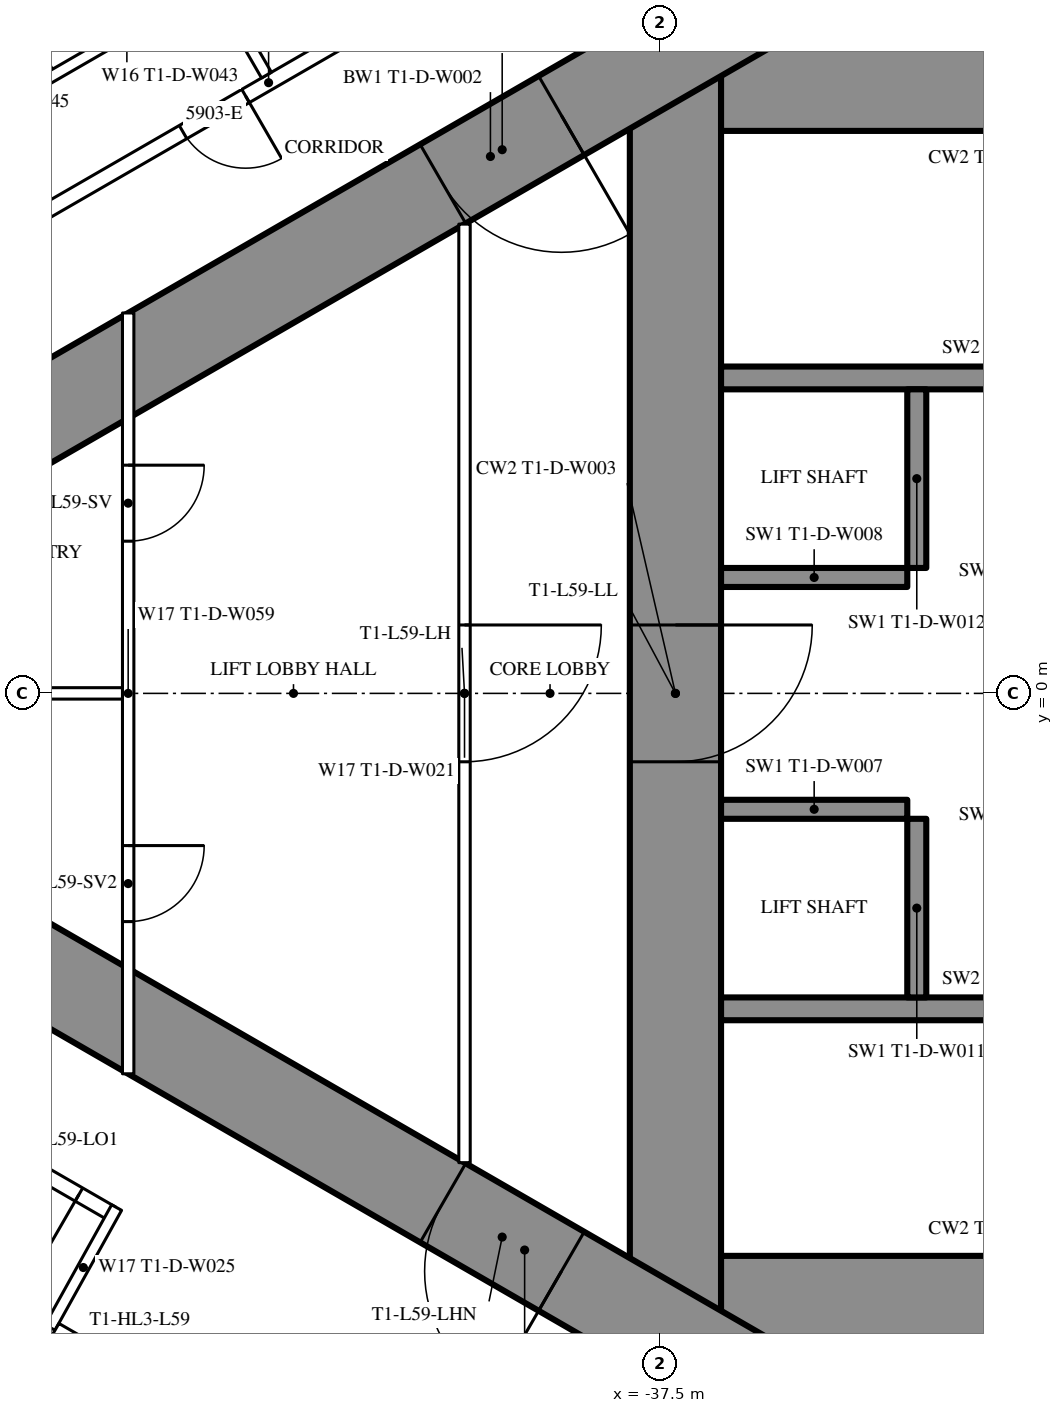
"""IFC4 building model, lengths in metres.
Left out: names, types, materials, properties, quantities, classifications, styles, units other than length and angle.
Written with IfcOpenShell. Run it as: python <this file> out.ifc"""

import sys

from ifc_helpers import new_model, si_unit, direction, frame, frame_2d, origin, place, context, subcontext, project, spatial, rectangle, extrude, element, fill, save


model = new_model("IFC4")
c1 = context("Model", 3, precision=1e-05, world=origin(), true_north=direction((0.0, 1.0)))
c2 = subcontext(c1, "Body", "Model", "MODEL_VIEW")
j1 = project(units=[si_unit("LENGTHUNIT", "METRE"), si_unit("PLANEANGLEUNIT", "RADIAN")], contexts=[c1])
p1 = place(None, origin())
s1 = spatial("IfcSite", under=j1, at=p1, CompositionType="ELEMENT")
p2 = place(p1, origin())
s2 = spatial("IfcBuilding", under=s1, at=p2, CompositionType="ELEMENT")
p3 = place(p2, frame((0.0, 0.0, 222.5)))
s3 = spatial("IfcBuildingStorey", under=s2, at=p3, CompositionType="ELEMENT", Elevation=222.5)
p4 = place(p3, frame((-37.3, 8.6, 0.0), z_axis=(0.0, 0.0, 1.0), x_axis=(0.0, -1.0, 0.0)))
e1 = element("IfcWall", 1, at=p4, inside=s3, PredefinedType="SHEAR", context=c2, shape_type="SweptSolid", body=[
    extrude(rectangle(XDim=17.2, YDim=1.2, at=frame_2d((8.6, 0.0))), origin(), (0.0, 0.0, 1.0), 3.6),
])
p5 = place(p4, frame((7.7, 0.0, 0.0)))
e2 = element("IfcOpeningElement", 2, at=p5, cuts=e1, PredefinedType="OPENING", context=c2, shape_type="SweptSolid", body=[
    extrude(rectangle(XDim=1.8, YDim=2.2, at=frame_2d((0.9, 1.1))), frame((0.0, 0.61, 0.0), z_axis=(0.0, -1.0, 0.0), x_axis=(1.0, 0.0, 0.0)), (0.0, 0.0, 1.0), 1.22),
])
p6 = place(p3, frame((-28.3, 8.0, 0.0), z_axis=(0.0, 0.0, 1.0), x_axis=(-1.0, 0.0, 0.0)))
e3 = element("IfcWall", 3, at=p6, inside=s3, PredefinedType="SHEAR", context=c2, shape_type="SweptSolid", body=[
    extrude(rectangle(XDim=8.4, YDim=1.2, at=frame_2d((4.2, 0.0))), origin(), (0.0, 0.0, 1.0), 3.6),
])
p7 = place(p6, frame((0.25, 0.0, 0.0)))
e4 = element("IfcOpeningElement", 4, at=p7, cuts=e3, PredefinedType="OPENING", context=c2, shape_type="SweptSolid", body=[
    extrude(rectangle(XDim=1.0, YDim=2.2, at=frame_2d((0.5, 1.1))), frame((0.0, 0.61, 0.0), z_axis=(0.0, -1.0, 0.0), x_axis=(1.0, 0.0, 0.0)), (0.0, 0.0, 1.0), 1.22),
])
p8 = place(p3, frame((-28.3, -8.0, 0.0), z_axis=(0.0, 0.0, 1.0), x_axis=(-1.0, 0.0, 0.0)))
e5 = element("IfcWall", 5, at=p8, inside=s3, PredefinedType="SHEAR", context=c2, shape_type="SweptSolid", body=[
    extrude(rectangle(XDim=8.4, YDim=1.2, at=frame_2d((4.2, 0.0))), origin(), (0.0, 0.0, 1.0), 3.6),
])
p9 = place(p8, frame((0.25, 0.0, 0.0)))
e6 = element("IfcOpeningElement", 6, at=p9, cuts=e5, PredefinedType="OPENING", context=c2, shape_type="SweptSolid", body=[
    extrude(rectangle(XDim=1.0, YDim=2.2, at=frame_2d((0.5, 1.1))), frame((0.0, 0.61, 0.0), z_axis=(0.0, -1.0, 0.0), x_axis=(1.0, 0.0, 0.0)), (0.0, 0.0, 1.0), 1.22),
])
for number, where, z_axis, x_axis in (
    (7, (-28.3, 4.15, 0.0), (0.0, 0.0, 1.0), (-1.0, 0.0, 0.0)),
    (8, (-28.3, -4.15, 0.0), (0.0, 0.0, 1.0), (-1.0, 0.0, 0.0)),
):
    element("IfcWall", number, at=place(p3, frame(where, z_axis=z_axis, x_axis=x_axis)), inside=s3, PredefinedType="SHEAR", context=c2, shape_type="SweptSolid", body=[
        extrude(rectangle(XDim=8.4, YDim=0.3, at=frame_2d((4.2, 0.0))), origin(), (0.0, 0.0, 1.0), 3.6),
    ])
p10 = place(p3, frame((-34.125, 4.0, 0.0), z_axis=(0.0, 0.0, 1.0), x_axis=(0.0, -1.0, 0.0)))
e9 = element("IfcWall", 9, at=p10, inside=s3, PredefinedType="SHEAR", context=c2, shape_type="SweptSolid", body=[
    extrude(rectangle(XDim=2.35, YDim=0.25, at=frame_2d((1.175, 0.0))), origin(), (0.0, 0.0, 1.0), 3.6),
])
p11 = place(p3, frame((-34.25, 1.525, 0.0), z_axis=(0.0, 0.0, 1.0), x_axis=(-1.0, 0.0, 0.0)))
e10 = element("IfcWall", 10, at=p11, inside=s3, PredefinedType="SHEAR", context=c2, shape_type="SweptSolid", body=[
    extrude(rectangle(XDim=2.45, YDim=0.25, at=frame_2d((1.225, 0.0))), origin(), (0.0, 0.0, 1.0), 3.6),
])
p12 = place(p3, frame((-34.125, -1.65, 0.0), z_axis=(0.0, 0.0, 1.0), x_axis=(0.0, -1.0, 0.0)))
e11 = element("IfcWall", 11, at=p12, inside=s3, PredefinedType="SHEAR", context=c2, shape_type="SweptSolid", body=[
    extrude(rectangle(XDim=2.35, YDim=0.25, at=frame_2d((1.175, 0.0))), origin(), (0.0, 0.0, 1.0), 3.6),
])
p13 = place(p3, frame((-34.25, -1.525, 0.0), z_axis=(0.0, 0.0, 1.0), x_axis=(-1.0, 0.0, 0.0)))
e12 = element("IfcWall", 12, at=p13, inside=s3, PredefinedType="SHEAR", context=c2, shape_type="SweptSolid", body=[
    extrude(rectangle(XDim=2.45, YDim=0.25, at=frame_2d((1.225, 0.0))), origin(), (0.0, 0.0, 1.0), 3.6),
])
p14 = place(p3, frame((-27.2, 14.3, 0.0), z_axis=(0.0, 0.0, 1.0), x_axis=(-0.866026593062, -0.499997940104, 0.0)))
e13 = element("IfcWall", 13, at=p14, inside=s3, PredefinedType="SHEAR", context=c2, shape_type="SweptSolid", body=[
    extrude(rectangle(XDim=28.946, YDim=1.2, at=frame_2d((14.473, 0.0))), origin(), (0.0, 0.0, 1.0), 3.6),
])
p15 = place(p14, frame((4.6, 0.0, 0.0)))
e14 = element("IfcOpeningElement", 14, at=p15, cuts=e13, PredefinedType="OPENING", context=c2, shape_type="SweptSolid", body=[
    extrude(rectangle(XDim=1.0, YDim=2.2, at=frame_2d((0.5, 1.1))), frame((0.0, 0.61, 0.0), z_axis=(0.0, -1.0, 0.0), x_axis=(1.0, 0.0, 0.0)), (0.0, 0.0, 1.0), 1.22),
])
p16 = place(p14, frame((13.395, 0.0, 0.0)))
e15 = element("IfcOpeningElement", 15, at=p16, cuts=e13, PredefinedType="OPENING", context=c2, shape_type="SweptSolid", body=[
    extrude(rectangle(XDim=1.8, YDim=2.2, at=frame_2d((0.9, 1.1))), frame((0.0, 0.61, 0.0), z_axis=(0.0, -1.0, 0.0), x_axis=(1.0, 0.0, 0.0)), (0.0, 0.0, 1.0), 1.22),
])
p17 = place(p3, frame((-27.2, -14.3, 0.0), z_axis=(0.0, 0.0, 1.0), x_axis=(-0.866024021859, 0.500002393557, 0.0)))
e16 = element("IfcWall", 16, at=p17, inside=s3, PredefinedType="SHEAR", context=c2, shape_type="SweptSolid", body=[
    extrude(rectangle(XDim=27.907, YDim=1.2, at=frame_2d((13.954, 0.0))), origin(), (0.0, 0.0, 1.0), 3.6),
])
p18 = place(p17, frame((4.6, 0.0, 0.0)))
e17 = element("IfcOpeningElement", 17, at=p18, cuts=e16, PredefinedType="OPENING", context=c2, shape_type="SweptSolid", body=[
    extrude(rectangle(XDim=1.0, YDim=2.2, at=frame_2d((0.5, 1.1))), frame((0.0, 0.61, 0.0), z_axis=(0.0, -1.0, 0.0), x_axis=(1.0, 0.0, 0.0)), (0.0, 0.0, 1.0), 1.22),
])
p19 = place(p17, frame((13.395, 0.0, 0.0)))
e18 = element("IfcOpeningElement", 18, at=p19, cuts=e16, PredefinedType="OPENING", context=c2, shape_type="SweptSolid", body=[
    extrude(rectangle(XDim=1.8, YDim=2.2, at=frame_2d((0.9, 1.1))), frame((0.0, 0.61, 0.0), z_axis=(0.0, -1.0, 0.0), x_axis=(1.0, 0.0, 0.0)), (0.0, 0.0, 1.0), 1.22),
])
p20 = place(p3, frame((-28.737, 16.068, 0.0), z_axis=(0.0, 0.0, 1.0), x_axis=(-0.866026057212, -0.499998868229, 0.0)))
e19 = element("IfcWall", 19, at=p20, inside=s3, PredefinedType="PARTITIONING", context=c2, shape_type="SweptSolid", body=[
    extrude(rectangle(XDim=32.137, YDim=0.2, at=frame_2d((16.068, 0.0))), origin(), (0.0, 0.0, 1.0), 3.35),
])
p21 = place(p20, frame((1.08, 0.0, 0.0)))
e20 = element("IfcOpeningElement", 20, at=p21, cuts=e19, PredefinedType="OPENING", context=c2, shape_type="SweptSolid", body=[
    extrude(rectangle(XDim=1.8, YDim=2.03, at=frame_2d((0.9, 1.015))), frame((0.0, 0.11, 0.0), z_axis=(0.0, -1.0, 0.0), x_axis=(1.0, 0.0, 0.0)), (0.0, 0.0, 1.0), 0.22),
])
p22 = place(p20, frame((6.86, 0.0, 0.0)))
e21 = element("IfcOpeningElement", 21, at=p22, cuts=e19, PredefinedType="OPENING", context=c2, shape_type="SweptSolid", body=[
    extrude(rectangle(XDim=1.0, YDim=2.2, at=frame_2d((0.5, 1.1))), frame((0.0, 0.11, 0.0), z_axis=(0.0, -1.0, 0.0), x_axis=(1.0, 0.0, 0.0)), (0.0, 0.0, 1.0), 0.22),
])
p23 = place(p20, frame((16.418, 0.0, 0.0)))
e22 = element("IfcOpeningElement", 22, at=p23, cuts=e19, PredefinedType="OPENING", context=c2, shape_type="SweptSolid", body=[
    extrude(rectangle(XDim=0.95, YDim=2.2, at=frame_2d((0.475, 1.1))), frame((0.0, 0.11, 0.0), z_axis=(0.0, -1.0, 0.0), x_axis=(1.0, 0.0, 0.0)), (0.0, 0.0, 1.0), 0.22),
])
p24 = place(p20, frame((20.567, 0.0, 0.0)))
e23 = element("IfcOpeningElement", 23, at=p24, cuts=e19, PredefinedType="OPENING", context=c2, shape_type="SweptSolid", body=[
    extrude(rectangle(XDim=0.95, YDim=2.2, at=frame_2d((0.475, 1.1))), frame((0.0, 0.11, 0.0), z_axis=(0.0, -1.0, 0.0), x_axis=(1.0, 0.0, 0.0)), (0.0, 0.0, 1.0), 0.22),
])
p25 = place(p20, frame((27.065, 0.0, 0.0)))
e24 = element("IfcOpeningElement", 24, at=p25, cuts=e19, PredefinedType="OPENING", context=c2, shape_type="SweptSolid", body=[
    extrude(rectangle(XDim=0.95, YDim=2.2, at=frame_2d((0.475, 1.1))), frame((0.0, 0.11, 0.0), z_axis=(0.0, -1.0, 0.0), x_axis=(1.0, 0.0, 0.0)), (0.0, 0.0, 1.0), 0.22),
])
p26 = place(p3, frame((-42.68, 8.134, 0.0), z_axis=(0.0, 0.0, 1.0), x_axis=(-0.499984479505, 0.866034364361, 0.0)))
e25 = element("IfcWall", 25, at=p26, inside=s3, PredefinedType="PARTITIONING", context=c2, shape_type="SweptSolid", body=[
    extrude(rectangle(XDim=5.995, YDim=0.15, at=frame_2d((2.998, 0.0))), origin(), (0.0, 0.0, 1.0), 2.45),
])
p27 = place(p3, frame((-44.715, -6.844, 0.0), z_axis=(0.0, 0.0, 1.0), x_axis=(-0.866025261224, 0.500000246922, 0.0)))
e26 = element("IfcWall", 26, at=p27, inside=s3, PredefinedType="PARTITIONING", context=c2, shape_type="SweptSolid", body=[
    extrude(rectangle(XDim=13.567, YDim=0.2, at=frame_2d((6.783, 0.0))), origin(), (0.0, 0.0, 1.0), 3.35),
])
p28 = place(p27, frame((9.667, 0.0, 0.0)))
e27 = element("IfcOpeningElement", 27, at=p28, cuts=e26, PredefinedType="OPENING", context=c2, shape_type="SweptSolid", body=[
    extrude(rectangle(XDim=0.95, YDim=2.2, at=frame_2d((0.475, 1.1))), frame((0.0, 0.11, 0.0), z_axis=(0.0, -1.0, 0.0), x_axis=(1.0, 0.0, 0.0)), (0.0, 0.0, 1.0), 0.22),
])
p29 = place(p27, frame((2.117, 0.0, 0.0)))
e28 = element("IfcOpeningElement", 28, at=p29, cuts=e26, PredefinedType="OPENING", context=c2, shape_type="SweptSolid", body=[
    extrude(rectangle(XDim=0.95, YDim=2.2, at=frame_2d((0.475, 1.1))), frame((0.0, 0.11, 0.0), z_axis=(0.0, -1.0, 0.0), x_axis=(1.0, 0.0, 0.0)), (0.0, 0.0, 1.0), 0.22),
])
p30 = place(p27, frame((0.5, 0.0, 0.0)))
e29 = element("IfcOpeningElement", 29, at=p30, cuts=e26, PredefinedType="OPENING", context=c2, shape_type="SweptSolid", body=[
    extrude(rectangle(XDim=0.967, YDim=2.2, at=frame_2d((0.483, 1.1))), frame((0.0, 0.11, 0.0), z_axis=(0.0, -1.0, 0.0), x_axis=(1.0, 0.0, 0.0)), (0.0, 0.0, 1.0), 0.22),
])
p31 = place(p3, frame((-44.652, -6.764, 0.0), z_axis=(0.0, 0.0, 1.0), x_axis=(-0.485424724123, -0.874278466629, 0.0)))
e30 = element("IfcWall", 30, at=p31, inside=s3, PredefinedType="PARTITIONING", context=c2, shape_type="SweptSolid", body=[
    extrude(rectangle(XDim=1.805, YDim=0.15, at=frame_2d((0.903, 0.0))), origin(), (0.0, 0.0, 1.0), 3.35),
])
p32 = place(p3, frame((-45.524, 8.109, 0.0), z_axis=(0.0, 0.0, 1.0), x_axis=(-0.49997716683, 0.86603858612, 0.0)))
e31 = element("IfcWall", 31, at=p32, inside=s3, PredefinedType="PARTITIONING", context=c2, shape_type="SweptSolid", body=[
    extrude(rectangle(XDim=2.6, YDim=0.15, at=frame_2d((1.3, 0.0))), origin(), (0.0, 0.0, 1.0), 3.35),
])
p33 = place(p32, frame((0.9, 0.0, 0.0)))
e32 = element("IfcOpeningElement", 32, at=p33, cuts=e31, PredefinedType="OPENING", context=c2, shape_type="SweptSolid", body=[
    extrude(rectangle(XDim=0.8, YDim=2.2, at=frame_2d((0.4, 1.1))), frame((0.0, 0.085, 0.0), z_axis=(0.0, -1.0, 0.0), x_axis=(1.0, 0.0, 0.0)), (0.0, 0.0, 1.0), 0.17),
])
p34 = place(p3, frame((-43.445, 9.309, 0.0), z_axis=(0.0, 0.0, 1.0), x_axis=(-0.866031185235, -0.4999899861, 0.0)))
e33 = element("IfcWall", 33, at=p34, inside=s3, PredefinedType="PARTITIONING", context=c2, shape_type="SweptSolid", body=[
    extrude(rectangle(XDim=2.475, YDim=0.15, at=frame_2d((1.238, 0.0))), origin(), (0.0, 0.0, 1.0), 3.35),
])
p35 = place(p3, frame((-40.075, 6.174, 0.0), z_axis=(0.0, 0.0, 1.0), x_axis=(0.0, -1.0, 0.0)))
e34 = element("IfcWall", 34, at=p35, inside=s3, PredefinedType="PARTITIONING", context=c2, shape_type="SweptSolid", body=[
    extrude(rectangle(XDim=12.348, YDim=0.15, at=frame_2d((6.174, 0.0))), origin(), (0.0, 0.0, 1.0), 3.35),
])
p36 = place(p35, frame((5.274, 0.0, 0.0)))
e35 = element("IfcOpeningElement", 35, at=p36, cuts=e34, PredefinedType="OPENING", context=c2, shape_type="SweptSolid", body=[
    extrude(rectangle(XDim=1.8, YDim=2.2, at=frame_2d((0.9, 1.1))), frame((0.0, 0.085, 0.0), z_axis=(0.0, -1.0, 0.0), x_axis=(1.0, 0.0, 0.0)), (0.0, 0.0, 1.0), 0.17),
])
p37 = place(p3, frame((-44.5, 5.005, 0.0), z_axis=(0.0, 0.0, 1.0), x_axis=(0.0, -1.0, 0.0)))
e36 = element("IfcWall", 36, at=p37, inside=s3, PredefinedType="PARTITIONING", context=c2, shape_type="SweptSolid", body=[
    extrude(rectangle(XDim=10.009, YDim=0.15, at=frame_2d((5.005, 0.0))), origin(), (0.0, 0.0, 1.0), 2.5),
])
p38 = place(p37, frame((2.002, 0.0, 0.0)))
e37 = element("IfcOpeningElement", 37, at=p38, cuts=e36, PredefinedType="OPENING", context=c2, shape_type="SweptSolid", body=[
    extrude(rectangle(XDim=1.0, YDim=2.2, at=frame_2d((0.5, 1.1))), frame((0.0, 0.085, 0.0), z_axis=(0.0, -1.0, 0.0), x_axis=(1.0, 0.0, 0.0)), (0.0, 0.0, 1.0), 0.17),
])
p39 = place(p37, frame((7.007, 0.0, 0.0)))
e38 = element("IfcOpeningElement", 38, at=p39, cuts=e36, PredefinedType="OPENING", context=c2, shape_type="SweptSolid", body=[
    extrude(rectangle(XDim=1.0, YDim=2.2, at=frame_2d((0.5, 1.1))), frame((0.0, 0.085, 0.0), z_axis=(0.0, -1.0, 0.0), x_axis=(1.0, 0.0, 0.0)), (0.0, 0.0, 1.0), 0.17),
])
p40 = place(p3, frame((-44.575, 0.0, 0.0), z_axis=(0.0, 0.0, 1.0), x_axis=(-1.0, 0.0, 0.0)))
e39 = element("IfcWall", 39, at=p40, inside=s3, PredefinedType="PARTITIONING", context=c2, shape_type="SweptSolid", body=[
    extrude(rectangle(XDim=8.593, YDim=0.15, at=frame_2d((4.297, 0.0))), origin(), (0.0, 0.0, 1.0), 2.45),
])
p41 = place(p3, frame((-39.758, -11.697, 0.0), z_axis=(0.0, 0.0, 1.0), x_axis=(-0.866024194504, 0.500002094529, 0.0)))
e40 = element("IfcWall", 40, at=p41, inside=s3, PredefinedType="PARTITIONING", context=c2, shape_type="SweptSolid", body=[
    extrude(rectangle(XDim=6.6, YDim=0.25, at=frame_2d((3.3, 0.0))), origin(), (0.0, 0.0, 1.0), 3.35),
])
p42 = place(p41, frame((0.75, 0.0, 0.0)))
e41 = element("IfcOpeningElement", 41, at=p42, cuts=e40, PredefinedType="OPENING", context=c2, shape_type="SweptSolid", body=[
    extrude(rectangle(XDim=1.1, YDim=2.2, at=frame_2d((0.55, 1.1))), frame((0.0, 0.135, 0.0), z_axis=(0.0, -1.0, 0.0), x_axis=(1.0, 0.0, 0.0)), (0.0, 0.0, 1.0), 0.27),
])
p43 = place(p41, frame((2.75, 0.0, 0.0)))
e42 = element("IfcOpeningElement", 42, at=p43, cuts=e40, PredefinedType="OPENING", context=c2, shape_type="SweptSolid", body=[
    extrude(rectangle(XDim=1.1, YDim=2.2, at=frame_2d((0.55, 1.1))), frame((0.0, 0.135, 0.0), z_axis=(0.0, -1.0, 0.0), x_axis=(1.0, 0.0, 0.0)), (0.0, 0.0, 1.0), 0.27),
])
p44 = place(p41, frame((4.75, 0.0, 0.0)))
e43 = element("IfcOpeningElement", 43, at=p44, cuts=e40, PredefinedType="OPENING", context=c2, shape_type="SweptSolid", body=[
    extrude(rectangle(XDim=1.1, YDim=2.2, at=frame_2d((0.55, 1.1))), frame((0.0, 0.135, 0.0), z_axis=(0.0, -1.0, 0.0), x_axis=(1.0, 0.0, 0.0)), (0.0, 0.0, 1.0), 0.27),
])
p45 = place(p23, origin())
e44 = element("IfcDoor", 44, at=p45, inside=s3, OperationType="SINGLE_SWING_LEFT", PredefinedType="DOOR", context=c2, shape_type="SweptSolid", body=[
    extrude(rectangle(XDim=0.95, YDim=2.2, at=frame_2d((0.475, 1.1))), frame((0.0, 0.025, 0.0), z_axis=(0.0, -1.0, 0.0), x_axis=(1.0, 0.0, 0.0)), (0.0, 0.0, 1.0), 0.05),
])
fill(e22, e44)
p46 = place(p30, origin())
e45 = element("IfcDoor", 45, at=p46, inside=s3, OperationType="SINGLE_SWING_LEFT", PredefinedType="DOOR", context=c2, shape_type="SweptSolid", body=[
    extrude(rectangle(XDim=0.967, YDim=2.2, at=frame_2d((0.483, 1.1))), frame((0.0, 0.025, 0.0), z_axis=(0.0, -1.0, 0.0), x_axis=(1.0, 0.0, 0.0)), (0.0, 0.0, 1.0), 0.05),
])
fill(e29, e45)
p47 = place(p36, origin())
e46 = element("IfcDoor", 46, at=p47, inside=s3, OperationType="DOUBLE_DOOR_SINGLE_SWING", PredefinedType="DOOR", context=c2, shape_type="SweptSolid", body=[
    extrude(rectangle(XDim=1.8, YDim=2.2, at=frame_2d((0.9, 1.1))), frame((0.0, 0.025, 0.0), z_axis=(0.0, -1.0, 0.0), x_axis=(1.0, 0.0, 0.0)), (0.0, 0.0, 1.0), 0.05),
])
fill(e35, e46)
p48 = place(p38, origin())
e47 = element("IfcDoor", 47, at=p48, inside=s3, OperationType="SINGLE_SWING_LEFT", PredefinedType="DOOR", context=c2, shape_type="SweptSolid", body=[
    extrude(rectangle(XDim=1.0, YDim=2.2, at=frame_2d((0.5, 1.1))), frame((0.0, 0.025, 0.0), z_axis=(0.0, -1.0, 0.0), x_axis=(1.0, 0.0, 0.0)), (0.0, 0.0, 1.0), 0.05),
])
fill(e37, e47)
p49 = place(p39, origin())
e48 = element("IfcDoor", 48, at=p49, inside=s3, OperationType="SINGLE_SWING_LEFT", PredefinedType="DOOR", context=c2, shape_type="SweptSolid", body=[
    extrude(rectangle(XDim=1.0, YDim=2.2, at=frame_2d((0.5, 1.1))), frame((0.0, 0.025, 0.0), z_axis=(0.0, -1.0, 0.0), x_axis=(1.0, 0.0, 0.0)), (0.0, 0.0, 1.0), 0.05),
])
fill(e38, e48)
p50 = place(p16, origin())
e49 = element("IfcDoor", 49, at=p50, inside=s3, OperationType="DOUBLE_DOOR_SINGLE_SWING", PredefinedType="DOOR", context=c2, shape_type="SweptSolid", body=[
    extrude(rectangle(XDim=1.8, YDim=2.2, at=frame_2d((0.9, 1.1))), frame((0.0, 0.025, 0.0), z_axis=(0.0, -1.0, 0.0), x_axis=(1.0, 0.0, 0.0)), (0.0, 0.0, 1.0), 0.05),
])
fill(e15, e49)
p51 = place(p19, origin())
e50 = element("IfcDoor", 50, at=p51, inside=s3, OperationType="DOUBLE_DOOR_SINGLE_SWING", PredefinedType="DOOR", context=c2, shape_type="SweptSolid", body=[
    extrude(rectangle(XDim=1.8, YDim=2.2, at=frame_2d((0.9, 1.1))), frame((0.0, 0.025, 0.0), z_axis=(0.0, -1.0, 0.0), x_axis=(1.0, 0.0, 0.0)), (0.0, 0.0, 1.0), 0.05),
])
fill(e18, e50)
p52 = place(p5, origin())
e51 = element("IfcDoor", 51, at=p52, inside=s3, OperationType="DOUBLE_DOOR_SINGLE_SWING", PredefinedType="DOOR", context=c2, shape_type="SweptSolid", body=[
    extrude(rectangle(XDim=1.8, YDim=2.2, at=frame_2d((0.9, 1.1))), frame((0.0, 0.025, 0.0), z_axis=(0.0, -1.0, 0.0), x_axis=(1.0, 0.0, 0.0)), (0.0, 0.0, 1.0), 0.05),
])
fill(e2, e51)
save(model, sys.argv[1])
